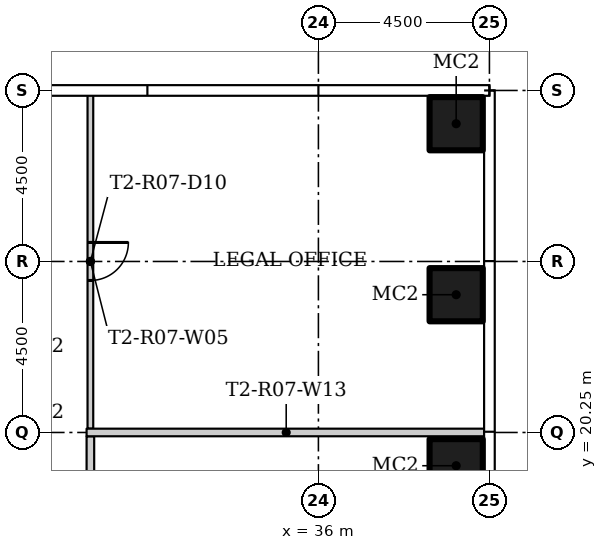
"""IFC4 building model, lengths in metres.
Left out: names, types, materials, properties, quantities, classifications, styles, units other than length and angle.
Written with IfcOpenShell. Run it as: python <this file> out.ifc"""

import sys

from ifc_helpers import new_model, si_unit, direction, frame, frame_2d, origin, origin_2d, place, context, subcontext, project, spatial, rectangle, hollow_rectangle, extrude, element, fill, save


model = new_model("IFC4")
c1 = context("Model", 3, precision=1e-05, world=origin(), true_north=direction((0.0, 1.0)))
c2 = subcontext(c1, "Body", "Model", "MODEL_VIEW")
j1 = project(units=[si_unit("LENGTHUNIT", "METRE"), si_unit("PLANEANGLEUNIT", "RADIAN")], contexts=[c1])
p1 = place(None, origin())
s1 = spatial("IfcSite", under=j1, at=p1, CompositionType="ELEMENT")
p2 = place(p1, origin())
s2 = spatial("IfcBuilding", under=s1, at=p2, CompositionType="ELEMENT")
p3 = place(p2, frame((0.0, 0.0, 73.2)))
s3 = spatial("IfcBuildingStorey", under=s2, at=p3, CompositionType="ELEMENT", Elevation=73.2)
for number, where in (
    (1, (39.625, 19.375, 0.0)),
    (2, (39.625, 23.875, 0.0)),
    (3, (39.625, 28.375, 0.0)),
):
    element("IfcColumn", number, at=place(p3, frame(where)), inside=s3, PredefinedType="COLUMN", context=c2, shape_type="SweptSolid", body=[
        extrude(hollow_rectangle(XDim=1.4, YDim=1.4, WallThickness=0.05, at=origin_2d()), origin(), (0.0, 0.0, 1.0), 3.45),
    ])
p4 = place(p3, frame((30.0, 20.15, 0.0), z_axis=(0.0, 0.0, 1.0), x_axis=(0.0, -1.0, 0.0)))
e4 = element("IfcWall", 4, at=p4, inside=s3, PredefinedType="PARTITIONING", context=c2, shape_type="SweptSolid", body=[
    extrude(rectangle(XDim=13.3, YDim=0.2, at=frame_2d((6.65, 0.0))), origin(), (0.0, 0.0, 1.0), 3.45),
])
p5 = place(p4, frame((5.9, 0.0, 0.0)))
e5 = element("IfcOpeningElement", 5, at=p5, cuts=e4, PredefinedType="OPENING", context=c2, shape_type="SweptSolid", body=[
    extrude(rectangle(XDim=1.5, YDim=2.1, at=frame_2d((0.75, 1.05))), frame((0.0, 0.11, 0.0), z_axis=(0.0, -1.0, 0.0), x_axis=(1.0, 0.0, 0.0)), (0.0, 0.0, 1.0), 0.22),
])
p6 = place(p3, frame((30.0, 29.155, 0.0), z_axis=(0.0, 0.0, 1.0), x_axis=(0.0, -1.0, 0.0)))
e6 = element("IfcWall", 6, at=p6, inside=s3, PredefinedType="PARTITIONING", context=c2, shape_type="SweptSolid", body=[
    extrude(rectangle(XDim=8.805, YDim=0.15, at=frame_2d((4.402, 0.0))), origin(), (0.0, 0.0, 1.0), 3.45),
])
p7 = place(p6, frame((3.905, 0.0, 0.0)))
e7 = element("IfcOpeningElement", 7, at=p7, cuts=e6, PredefinedType="OPENING", context=c2, shape_type="SweptSolid", body=[
    extrude(rectangle(XDim=1.0, YDim=2.4, at=frame_2d((0.5, 1.2))), frame((0.0, 0.085, 0.0), z_axis=(0.0, -1.0, 0.0), x_axis=(1.0, 0.0, 0.0)), (0.0, 0.0, 1.0), 0.17),
])
p8 = place(p3, frame((40.405, 20.25, 0.0), z_axis=(0.0, 0.0, 1.0), x_axis=(-1.0, 0.0, 0.0)))
e8 = element("IfcWall", 8, at=p8, inside=s3, PredefinedType="PARTITIONING", context=c2, shape_type="SweptSolid", body=[
    extrude(rectangle(XDim=10.505, YDim=0.2, at=frame_2d((5.252, 0.0))), origin(), (0.0, 0.0, 1.0), 3.45),
])
p9 = place(p7, origin())
e9 = element("IfcDoor", 9, at=p9, inside=s3, OperationType="SINGLE_SWING_LEFT", PredefinedType="DOOR", context=c2, shape_type="SweptSolid", body=[
    extrude(rectangle(XDim=1.0, YDim=2.4, at=frame_2d((0.5, 1.2))), frame((0.0, 0.025, 0.0), z_axis=(0.0, -1.0, 0.0), x_axis=(1.0, 0.0, 0.0)), (0.0, 0.0, 1.0), 0.05),
])
fill(e7, e9)
save(model, sys.argv[1])
